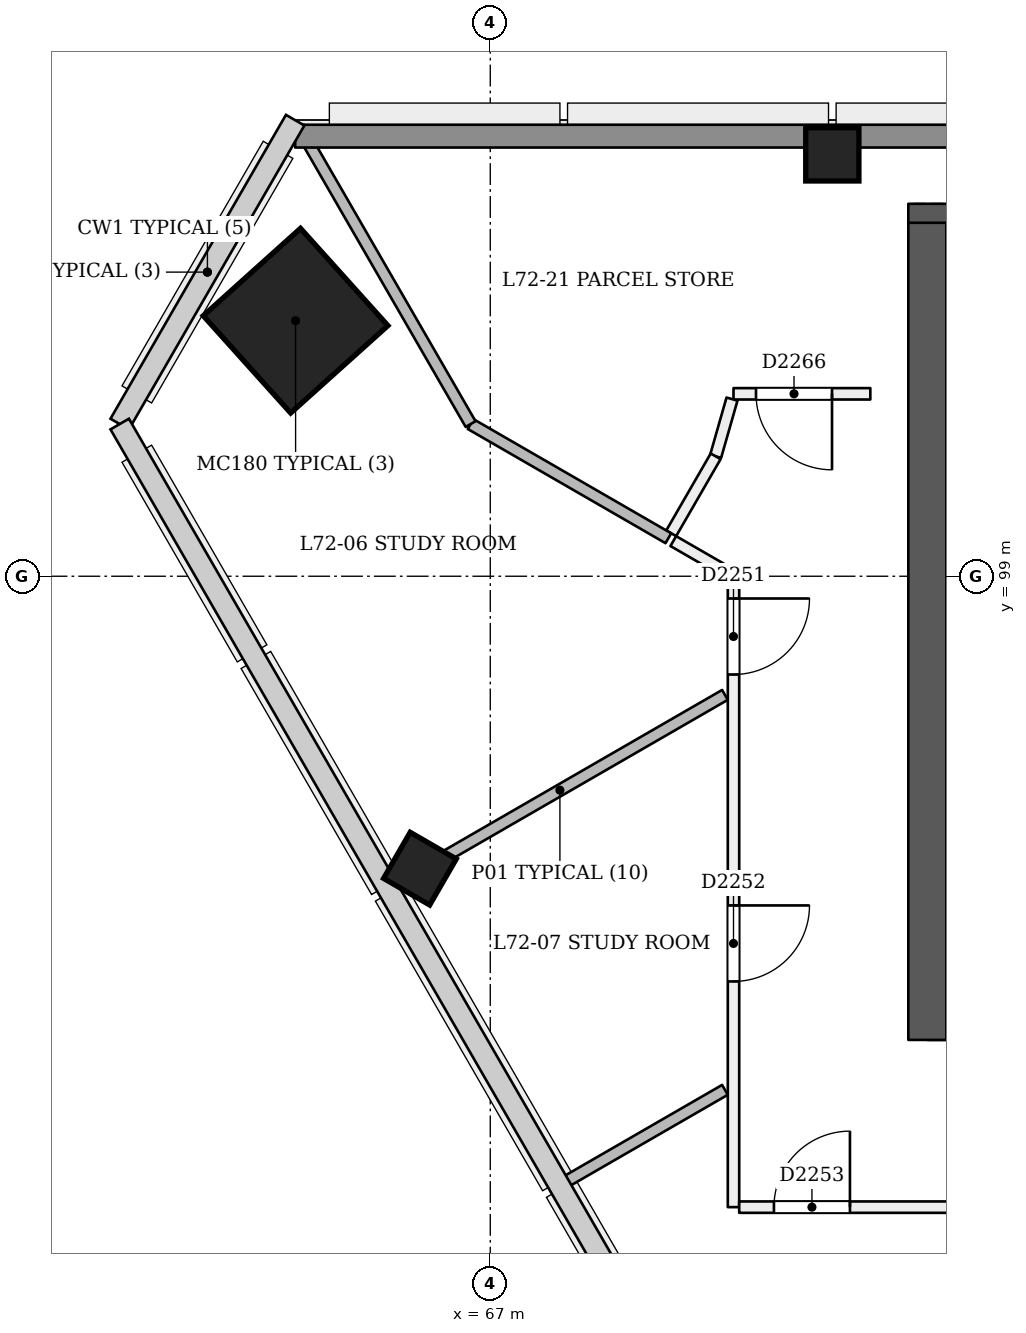
"""IFC4 building model, lengths in metres.
Left out: names, types, materials, properties, quantities, classifications, styles, units other than length and angle.
Written with IfcOpenShell. Run it as: python <this file> out.ifc"""

import sys

from ifc_helpers import new_model, si_unit, direction, frame, frame_2d, origin, origin_2d, place, context, subcontext, project, spatial, rectangle, extrude, element, fill, save


model = new_model("IFC4")
c1 = context("Model", 3, precision=1e-05, world=origin(), true_north=direction((0.0, 1.0)))
c2 = subcontext(c1, "Body", "Model", "MODEL_VIEW")
j1 = project(units=[si_unit("LENGTHUNIT", "METRE"), si_unit("PLANEANGLEUNIT", "RADIAN")], contexts=[c1])
p1 = place(None, origin())
s1 = spatial("IfcSite", under=j1, at=p1, CompositionType="ELEMENT")
p2 = place(p1, origin())
s2 = spatial("IfcBuilding", under=s1, at=p2, CompositionType="ELEMENT")
p3 = place(p2, frame((0.0, 0.0, 278.8)))
s3 = spatial("IfcBuildingStorey", under=s2, at=p3, CompositionType="ELEMENT", Elevation=278.8)
p4 = place(p3, frame((72.75, 93.15, 0.0), z_axis=(0.0, 0.0, 1.0), x_axis=(1.0, 0.0, 0.0)))
e1 = element("IfcWall", 1, at=p4, inside=s3, PredefinedType="SHEAR", context=c2, shape_type="SweptSolid", body=[
    extrude(rectangle(XDim=24.75, YDim=0.5, at=frame_2d((12.375, 0.0))), origin(), (0.0, 0.0, 1.0), 3.6),
])
p5 = place(p4, frame((1.05, 0.0, 0.0)))
e2 = element("IfcOpeningElement", 2, at=p5, cuts=e1, PredefinedType="OPENING", context=c2, shape_type="SweptSolid", body=[
    extrude(rectangle(XDim=1.2, YDim=2.1, at=frame_2d((0.6, 1.05))), frame((0.0, 0.26, 0.0), z_axis=(0.0, -1.0, 0.0), x_axis=(1.0, 0.0, 0.0)), (0.0, 0.0, 1.0), 0.521),
])
p6 = place(p4, frame((3.25, 0.0, 0.0)))
e3 = element("IfcOpeningElement", 3, at=p6, cuts=e1, PredefinedType="OPENING", context=c2, shape_type="SweptSolid", body=[
    extrude(rectangle(XDim=1.2, YDim=2.1, at=frame_2d((0.6, 1.05))), frame((0.0, 0.26, 0.0), z_axis=(0.0, -1.0, 0.0), x_axis=(1.0, 0.0, 0.0)), (0.0, 0.0, 1.0), 0.521),
])
p7 = place(p4, frame((13.25, 0.0, 0.0)))
e4 = element("IfcOpeningElement", 4, at=p7, cuts=e1, PredefinedType="OPENING", context=c2, shape_type="SweptSolid", body=[
    extrude(rectangle(XDim=1.2, YDim=2.1, at=frame_2d((0.6, 1.05))), frame((0.0, 0.26, 0.0), z_axis=(0.0, -1.0, 0.0), x_axis=(1.0, 0.0, 0.0)), (0.0, 0.0, 1.0), 0.521),
])
p8 = place(p4, frame((15.562, 0.0, 0.0)))
e5 = element("IfcOpeningElement", 5, at=p8, cuts=e1, PredefinedType="OPENING", context=c2, shape_type="SweptSolid", body=[
    extrude(rectangle(XDim=1.0, YDim=2.1, at=frame_2d((0.5, 1.05))), frame((0.0, 0.26, 0.0), z_axis=(0.0, -1.0, 0.0), x_axis=(1.0, 0.0, 0.0)), (0.0, 0.0, 1.0), 0.521),
])
p9 = place(p4, frame((19.0, 0.0, 0.0)))
e6 = element("IfcOpeningElement", 6, at=p9, cuts=e1, PredefinedType="OPENING", context=c2, shape_type="SweptSolid", body=[
    extrude(rectangle(XDim=1.0, YDim=2.1, at=frame_2d((0.5, 1.05))), frame((0.0, 0.26, 0.0), z_axis=(0.0, -1.0, 0.0), x_axis=(1.0, 0.0, 0.0)), (0.0, 0.0, 1.0), 0.521),
])
p10 = place(p4, frame((22.538, 0.0, 0.0)))
e7 = element("IfcOpeningElement", 7, at=p10, cuts=e1, PredefinedType="OPENING", context=c2, shape_type="SweptSolid", body=[
    extrude(rectangle(XDim=1.0, YDim=2.1, at=frame_2d((0.5, 1.05))), frame((0.0, 0.26, 0.0), z_axis=(0.0, -1.0, 0.0), x_axis=(1.0, 0.0, 0.0)), (0.0, 0.0, 1.0), 0.521),
])
p11 = place(p3, frame((97.25, 103.65, 0.0), z_axis=(0.0, 0.0, 1.0), x_axis=(-1.0, 0.0, 0.0)))
e8 = element("IfcWall", 8, at=p11, inside=s3, PredefinedType="SHEAR", context=c2, shape_type="SweptSolid", body=[
    extrude(rectangle(XDim=24.75, YDim=0.5, at=frame_2d((12.375, 0.0))), origin(), (0.0, 0.0, 1.0), 3.6),
])
p12 = place(p3, frame((72.75, 103.65, 0.0), z_axis=(0.0, 0.0, 1.0), x_axis=(0.0, -1.0, 0.0)))
e9 = element("IfcWall", 9, at=p12, inside=s3, PredefinedType="SHEAR", context=c2, shape_type="SweptSolid", body=[
    extrude(rectangle(XDim=10.75, YDim=0.5, at=frame_2d((5.375, 0.0))), origin(), (0.0, 0.0, 1.0), 3.6),
])
p13 = place(p3, frame((64.405, 102.351, 0.0), z_axis=(0.028336004223, 0.009219369795, 0.999555938447), x_axis=(-0.865480451458, 0.500546547608, 0.019918378992)))
e10 = element("IfcColumn", 10, at=p13, inside=s3, PredefinedType="COLUMN", context=c2, shape_type="SweptSolid", body=[
    extrude(rectangle(XDim=1.72, YDim=1.72, at=origin_2d()), origin(), (0.0, 0.0, 1.0), 3.602),
])
p14 = place(p3, frame((71.5, 104.55, 0.0), z_axis=(0.0, 0.0, 1.0), x_axis=(1.0, 0.0, 0.0)))
e11 = element("IfcColumn", 11, at=p14, inside=s3, PredefinedType="COLUMN", context=c2, shape_type="SweptSolid", body=[
    extrude(rectangle(XDim=0.7, YDim=0.7, at=origin_2d()), origin(), (0.0, 0.0, 1.0), 3.6),
])
p15 = place(p3, frame((66.048, 95.106, -0.021), z_axis=(0.022155133694, 0.038483534979, 0.999013597298), x_axis=(-0.864982365973, -0.50032653087, 0.038456066681)))
e12 = element("IfcColumn", 12, at=p15, inside=s3, PredefinedType="COLUMN", context=c2, shape_type="SweptSolid", body=[
    extrude(rectangle(XDim=0.7, YDim=0.7, at=origin_2d()), origin(), (0.0, 0.0, 1.0), 3.604),
])
p16 = place(p3, frame((69.408, 99.462, 0.0), z_axis=(0.0, 0.0, 1.0), x_axis=(0.866083370663, -0.499899584978, 0.0)))
e13 = element("IfcWall", 13, at=p16, inside=s3, PredefinedType="PARTITIONING", context=c2, shape_type="SweptSolid", body=[
    extrude(rectangle(XDim=0.915, YDim=0.15, at=frame_2d((0.458, 0.0))), origin(), (0.0, 0.0, 1.0), 3.2),
])
p17 = place(p3, frame((70.2, 99.005, 0.0), z_axis=(0.0, 0.0, 1.0), x_axis=(0.0, -1.0, 0.0)))
e14 = element("IfcWall", 14, at=p17, inside=s3, PredefinedType="PARTITIONING", context=c2, shape_type="SweptSolid", body=[
    extrude(rectangle(XDim=8.305, YDim=0.15, at=frame_2d((4.153, 0.0))), origin(), (0.0, 0.0, 1.0), 3.2),
])
p18 = place(p17, frame((0.298, 0.0, 0.0)))
e15 = element("IfcOpeningElement", 15, at=p18, cuts=e14, PredefinedType="OPENING", context=c2, shape_type="SweptSolid", body=[
    extrude(rectangle(XDim=1.0, YDim=2.1, at=frame_2d((0.5, 1.05))), frame((0.0, 0.085, 0.0), z_axis=(0.0, -1.0, 0.0), x_axis=(1.0, 0.0, 0.0)), (0.0, 0.0, 1.0), 0.171),
])
p19 = place(p17, frame((4.336, 0.0, 0.0)))
e16 = element("IfcOpeningElement", 16, at=p19, cuts=e14, PredefinedType="OPENING", context=c2, shape_type="SweptSolid", body=[
    extrude(rectangle(XDim=1.0, YDim=2.1, at=frame_2d((0.5, 1.05))), frame((0.0, 0.085, 0.0), z_axis=(0.0, -1.0, 0.0), x_axis=(1.0, 0.0, 0.0)), (0.0, 0.0, 1.0), 0.171),
])
p20 = place(p3, frame((70.275, 90.7, 0.0), z_axis=(0.0, 0.0, 1.0), x_axis=(1.0, 0.0, 0.0)))
e17 = element("IfcWall", 17, at=p20, inside=s3, PredefinedType="PARTITIONING", context=c2, shape_type="SweptSolid", body=[
    extrude(rectangle(XDim=5.303, YDim=0.15, at=frame_2d((2.652, 0.0))), origin(), (0.0, 0.0, 1.0), 3.2),
])
p21 = place(p20, frame((0.457, 0.0, 0.0)))
e18 = element("IfcOpeningElement", 18, at=p21, cuts=e17, PredefinedType="OPENING", context=c2, shape_type="SweptSolid", body=[
    extrude(rectangle(XDim=1.0, YDim=2.1, at=frame_2d((0.5, 1.05))), frame((0.0, 0.085, 0.0), z_axis=(0.0, -1.0, 0.0), x_axis=(1.0, 0.0, 0.0)), (0.0, 0.0, 1.0), 0.171),
])
p22 = place(p3, frame((72.0, 101.4, 0.0), z_axis=(0.0, 0.0, 1.0), x_axis=(-1.0, 0.0, 0.0)))
e19 = element("IfcWall", 19, at=p22, inside=s3, PredefinedType="PARTITIONING", context=c2, shape_type="SweptSolid", body=[
    extrude(rectangle(XDim=1.8, YDim=0.15, at=frame_2d((0.9, 0.0))), origin(), (0.0, 0.0, 1.0), 3.2),
])
p23 = place(p22, frame((0.504, 0.0, 0.0)))
e20 = element("IfcOpeningElement", 20, at=p23, cuts=e19, PredefinedType="OPENING", context=c2, shape_type="SweptSolid", body=[
    extrude(rectangle(XDim=1.0, YDim=2.1, at=frame_2d((0.5, 1.05))), frame((0.0, 0.085, 0.0), z_axis=(0.0, -1.0, 0.0), x_axis=(1.0, 0.0, 0.0)), (0.0, 0.0, 1.0), 0.171),
])
p24 = place(p3, frame((70.18, 101.331, 0.0), z_axis=(0.0, 0.0, 1.0), x_axis=(-0.27467994889, -0.961535712118, 0.0)))
e21 = element("IfcWall", 21, at=p24, inside=s3, PredefinedType="PARTITIONING", context=c2, shape_type="SweptSolid", body=[
    extrude(rectangle(XDim=0.783, YDim=0.15, at=frame_2d((0.392, 0.0))), origin(), (0.0, 0.0, 1.0), 3.2),
])
p25 = place(p3, frame((69.965, 100.578, 0.0), z_axis=(0.0, 0.0, 1.0), x_axis=(-0.500023656998, -0.86601174498, 0.0)))
e22 = element("IfcWall", 22, at=p25, inside=s3, PredefinedType="PARTITIONING", context=c2, shape_type="SweptSolid", body=[
    extrude(rectangle(XDim=1.169, YDim=0.15, at=frame_2d((0.585, 0.0))), origin(), (0.0, 0.0, 1.0), 3.2),
])
p26 = place(p3, frame((65.745, 94.932, 0.0), z_axis=(0.0, 0.0, 1.0), x_axis=(0.866032345022, 0.499987977232, 0.0)))
e23 = element("IfcWall", 23, at=p26, inside=s3, PredefinedType="PARTITIONING", context=c2, shape_type="SweptSolid", body=[
    extrude(rectangle(XDim=5.014, YDim=0.15, at=frame_2d((2.507, 0.0))), origin(), (0.0, 0.0, 1.0), 2.7),
])
p27 = place(p3, frame((69.343, 99.5, 0.0), z_axis=(0.0, 0.0, 1.0), x_axis=(-0.865998815133, 0.500046050067, 0.0)))
e24 = element("IfcWall", 24, at=p27, inside=s3, PredefinedType="PARTITIONING", context=c2, shape_type="SweptSolid", body=[
    extrude(rectangle(XDim=3.004, YDim=0.15, at=frame_2d((1.502, 0.0))), origin(), (0.0, 0.0, 1.0), 3.2),
])
p28 = place(p3, frame((66.741, 101.002, 0.0), z_axis=(0.0, 0.0, 1.0), x_axis=(-0.500024529875, 0.866011240991, 0.0)))
e25 = element("IfcWall", 25, at=p28, inside=s3, PredefinedType="PARTITIONING", context=c2, shape_type="SweptSolid", body=[
    extrude(rectangle(XDim=4.501, YDim=0.15, at=frame_2d((2.25, 0.0))), origin(), (0.0, 0.0, 1.0), 2.7),
])
p29 = place(p3, frame((67.977, 91.025, 0.0), z_axis=(0.0, 0.0, 1.0), x_axis=(0.866027068856, 0.499997116, 0.0)))
e26 = element("IfcWall", 26, at=p29, inside=s3, PredefinedType="PARTITIONING", context=c2, shape_type="SweptSolid", body=[
    extrude(rectangle(XDim=2.437, YDim=0.15, at=frame_2d((1.218, 0.0))), origin(), (0.0, 0.0, 1.0), 2.7),
])
p30 = place(p3, frame((70.245, 87.138, 0.0), z_axis=(0.0, 0.0, 1.0), x_axis=(0.866032601554, 0.49998753289, 0.0)))
e27 = element("IfcWall", 27, at=p30, inside=s3, PredefinedType="PARTITIONING", context=c2, shape_type="SweptSolid", body=[
    extrude(rectangle(XDim=6.325, YDim=0.15, at=frame_2d((3.163, 0.0))), origin(), (0.0, 0.0, 1.0), 2.7),
])
p31 = place(p3, frame((64.433, 104.79, 0.0), z_axis=(0.0, 0.0, 1.0), x_axis=(1.0, 0.0, 0.0)))
e28 = element("IfcWall", 28, at=p31, inside=s3, PredefinedType="SOLIDWALL", context=c2, shape_type="SweptSolid", body=[
    extrude(rectangle(XDim=41.134, YDim=0.3, at=frame_2d((20.567, 0.0))), origin(), (0.0, 0.0, 1.0), 2.7),
])
p32 = place(p18, origin())
e29 = element("IfcDoor", 29, at=p32, inside=s3, OperationType="SINGLE_SWING_LEFT", PredefinedType="NOTDEFINED", context=c2, shape_type="SweptSolid", body=[
    extrude(rectangle(XDim=1.0, YDim=2.1, at=frame_2d((0.5, 1.05))), frame((0.0, 0.025, 0.0), z_axis=(0.0, -1.0, 0.0), x_axis=(1.0, 0.0, 0.0)), (0.0, 0.0, 1.0), 0.05),
])
fill(e15, e29)
p33 = place(p19, origin())
e30 = element("IfcDoor", 30, at=p33, inside=s3, OperationType="SINGLE_SWING_LEFT", PredefinedType="NOTDEFINED", context=c2, shape_type="SweptSolid", body=[
    extrude(rectangle(XDim=1.0, YDim=2.1, at=frame_2d((0.5, 1.05))), frame((0.0, 0.025, 0.0), z_axis=(0.0, -1.0, 0.0), x_axis=(1.0, 0.0, 0.0)), (0.0, 0.0, 1.0), 0.05),
])
fill(e16, e30)
p34 = place(p21, origin())
e31 = element("IfcDoor", 31, at=p34, inside=s3, OperationType="SINGLE_SWING_RIGHT", PredefinedType="NOTDEFINED", context=c2, shape_type="SweptSolid", body=[
    extrude(rectangle(XDim=1.0, YDim=2.1, at=frame_2d((0.5, 1.05))), frame((0.0, 0.025, 0.0), z_axis=(0.0, -1.0, 0.0), x_axis=(1.0, 0.0, 0.0)), (0.0, 0.0, 1.0), 0.05),
])
fill(e18, e31)
p35 = place(p23, origin())
e32 = element("IfcDoor", 32, at=p35, inside=s3, OperationType="SINGLE_SWING_LEFT", PredefinedType="NOTDEFINED", context=c2, shape_type="SweptSolid", body=[
    extrude(rectangle(XDim=1.0, YDim=2.1, at=frame_2d((0.5, 1.05))), frame((0.0, 0.025, 0.0), z_axis=(0.0, -1.0, 0.0), x_axis=(1.0, 0.0, 0.0)), (0.0, 0.0, 1.0), 0.05),
])
fill(e20, e32)
save(model, sys.argv[1])
